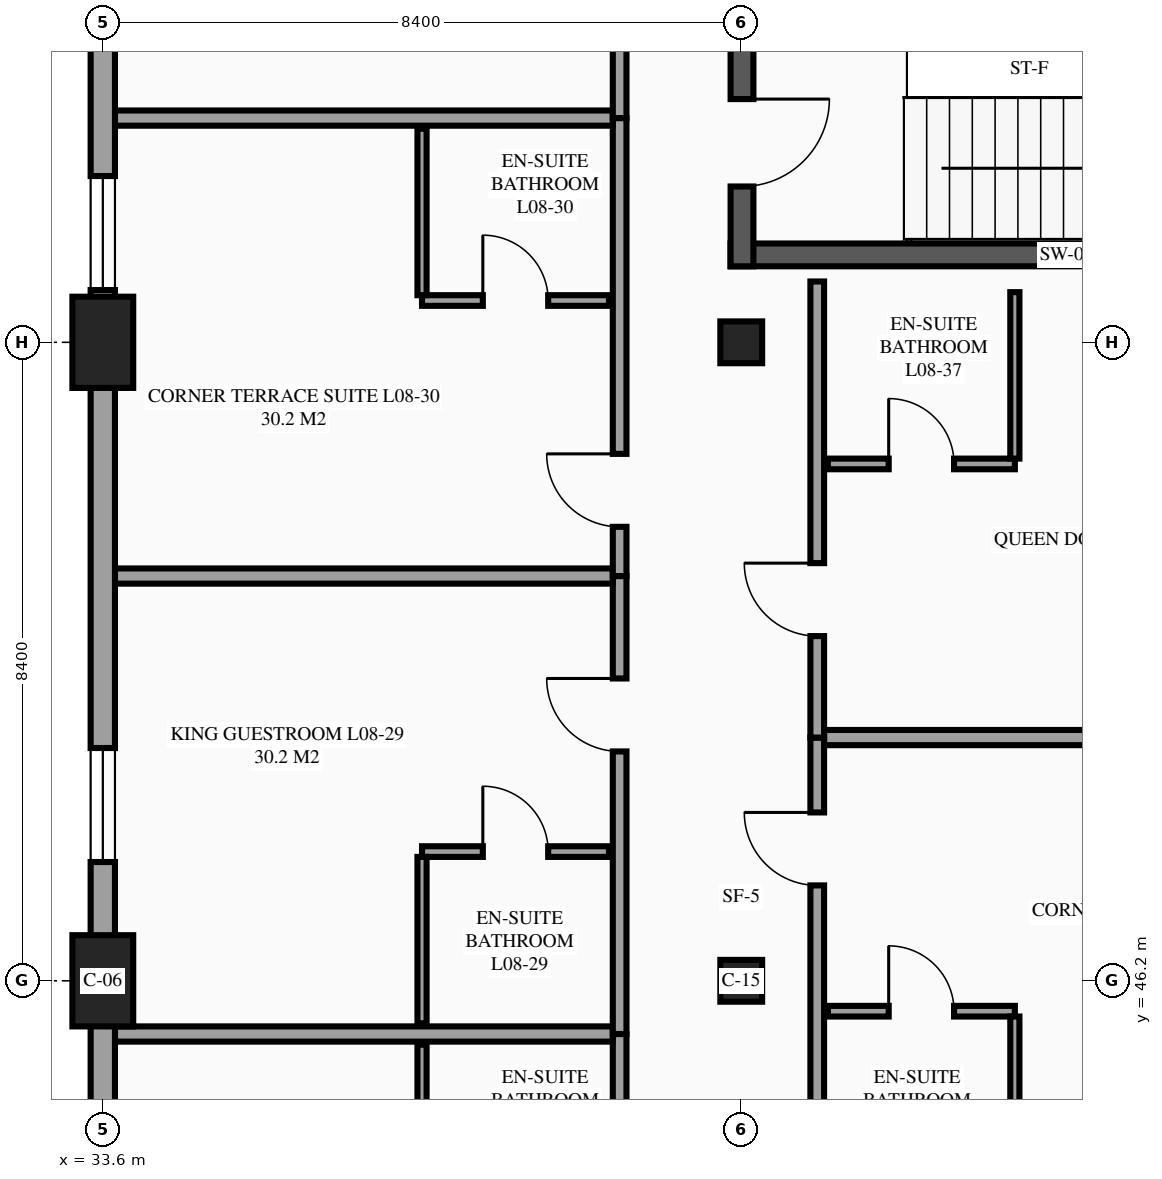
"""IFC4 building model, lengths in metres.
Left out: names, types, materials, properties, quantities, classifications, styles, units other than length and angle.
Written with IfcOpenShell. Run it as: python <this file> out.ifc"""

import sys

from ifc_helpers import new_model, si_unit, direction, frame, frame_2d, origin, origin_2d, place, context, subcontext, project, spatial, rectangle, extrude, element, fill, save


model = new_model("IFC4")
c1 = context("Model", 3, precision=1e-05, world=origin(), true_north=direction((0.0, 1.0)))
c2 = subcontext(c1, "Body", "Model", "MODEL_VIEW")
j1 = project(units=[si_unit("LENGTHUNIT", "METRE"), si_unit("PLANEANGLEUNIT", "RADIAN")], contexts=[c1])
p1 = place(None, origin())
s1 = spatial("IfcSite", under=j1, at=p1, CompositionType="ELEMENT")
p2 = place(p1, origin())
s2 = spatial("IfcBuilding", under=s1, at=p2, CompositionType="ELEMENT")
p3 = place(p2, frame((0.0, 0.0, 32.7)))
s3 = spatial("IfcBuildingStorey", under=s2, at=p3, CompositionType="ELEMENT", Elevation=32.7)
for number, where, z_axis, x_axis in (
    (1, (33.6, 46.2, 0.0), (0.0, 0.0, 1.0), (1.0, 0.0, 0.0)),
    (2, (33.6, 54.6, 0.0), (0.0, 0.0, 1.0), (1.0, 0.0, 0.0)),
):
    element("IfcColumn", number, at=place(p3, frame(where, z_axis=z_axis, x_axis=x_axis)), inside=s3, PredefinedType="COLUMN", context=c2, shape_type="SweptSolid", body=[
        extrude(rectangle(XDim=0.8, YDim=1.2, at=origin_2d()), origin(), (0.0, 0.0, 1.0), 3.6),
    ])
for number, where, z_axis, x_axis in (
    (3, (42.0, 46.2, 0.0), (0.0, 0.0, 1.0), (1.0, 0.0, 0.0)),
    (4, (42.0, 54.6, 0.0), (0.0, 0.0, 1.0), (1.0, 0.0, 0.0)),
):
    element("IfcColumn", number, at=place(p3, frame(where, z_axis=z_axis, x_axis=x_axis)), inside=s3, PredefinedType="COLUMN", context=c2, shape_type="SweptSolid", body=[
        extrude(rectangle(XDim=0.55, YDim=0.55, at=origin_2d()), origin(), (0.0, 0.0, 1.0), 3.6),
    ])
p4 = place(p3, frame((41.86, 55.75, 0.0), z_axis=(0.0, 0.0, 1.0), x_axis=(1.0, 0.0, 0.0)))
e5 = element("IfcWall", 5, at=p4, inside=s3, PredefinedType="SHEAR", context=c2, shape_type="SweptSolid", body=[
    extrude(rectangle(XDim=8.84, YDim=0.3, at=frame_2d((4.42, 0.0))), origin(), (0.0, 0.0, 1.0), 3.6),
])
p5 = place(p3, frame((42.01, 60.8, 0.0), z_axis=(0.0, 0.0, 1.0), x_axis=(0.0, -1.0, 0.0)))
e6 = element("IfcWall", 6, at=p5, inside=s3, PredefinedType="SHEAR", context=c2, shape_type="SweptSolid", body=[
    extrude(rectangle(XDim=5.2, YDim=0.3, at=frame_2d((2.6, 0.0))), origin(), (0.0, 0.0, 1.0), 3.6),
])
p6 = place(p5, frame((3.0, 0.0, 0.0)))
e7 = element("IfcOpeningElement", 7, at=p6, cuts=e6, PredefinedType="OPENING", context=c2, shape_type="SweptSolid", body=[
    extrude(rectangle(XDim=1.15, YDim=2.15, at=frame_2d((0.575, 1.075))), frame((0.0, 0.16, 0.0), z_axis=(0.0, -1.0, 0.0), x_axis=(1.0, 0.0, 0.0)), (0.0, 0.0, 1.0), 0.32),
])
p7 = place(p3, frame((40.4, 39.475, 0.0), z_axis=(0.0, 0.0, 1.0), x_axis=(0.0, 1.0, 0.0)))
e8 = element("IfcWall", 8, at=p7, inside=s3, PredefinedType="PARTITIONING", context=c2, shape_type="SweptSolid", body=[
    extrude(rectangle(XDim=6.025, YDim=0.18, at=frame_2d((3.012, 0.0))), origin(), (0.0, 0.0, 1.0), 3.375),
])
p8 = place(p7, frame((1.347, 0.0, 0.0)))
e9 = element("IfcOpeningElement", 9, at=p8, cuts=e8, PredefinedType="OPENING", context=c2, shape_type="SweptSolid", body=[
    extrude(rectangle(XDim=0.96, YDim=2.15, at=frame_2d((0.48, 1.075))), frame((0.0, 0.1, 0.0), z_axis=(0.0, -1.0, 0.0), x_axis=(1.0, 0.0, 0.0)), (0.0, 0.0, 1.0), 0.2),
])
p9 = place(p3, frame((33.76, 45.5, 0.0), z_axis=(0.0, 0.0, 1.0), x_axis=(1.0, 0.0, 0.0)))
e10 = element("IfcWall", 10, at=p9, inside=s3, PredefinedType="PARTITIONING", context=c2, shape_type="SweptSolid", body=[
    extrude(rectangle(XDim=6.55, YDim=0.2, at=frame_2d((3.275, 0.0))), origin(), (0.0, 0.0, 1.0), 3.375),
])
p10 = place(p3, frame((37.8, 43.17, 0.0), z_axis=(0.0, 0.0, 1.0), x_axis=(0.0, 1.0, 0.0)))
e11 = element("IfcWall", 11, at=p10, inside=s3, PredefinedType="PARTITIONING", context=c2, shape_type="SweptSolid", body=[
    extrude(rectangle(XDim=2.19, YDim=0.12, at=frame_2d((1.095, 0.0))), origin(), (0.0, 0.0, 1.0), 3.375),
])
p11 = place(p3, frame((40.4, 45.5, 0.0), z_axis=(0.0, 0.0, 1.0), x_axis=(0.0, 1.0, 0.0)))
e12 = element("IfcWall", 12, at=p11, inside=s3, PredefinedType="PARTITIONING", context=c2, shape_type="SweptSolid", body=[
    extrude(rectangle(XDim=6.025, YDim=0.18, at=frame_2d((3.012, 0.0))), origin(), (0.0, 0.0, 1.0), 3.375),
])
p12 = place(p11, frame((3.718, 0.0, 0.0)))
e13 = element("IfcOpeningElement", 13, at=p12, cuts=e12, PredefinedType="OPENING", context=c2, shape_type="SweptSolid", body=[
    extrude(rectangle(XDim=0.96, YDim=2.15, at=frame_2d((0.48, 1.075))), frame((0.0, 0.1, 0.0), z_axis=(0.0, -1.0, 0.0), x_axis=(1.0, 0.0, 0.0)), (0.0, 0.0, 1.0), 0.2),
])
p13 = place(p3, frame((33.76, 51.525, 0.0), z_axis=(0.0, 0.0, 1.0), x_axis=(1.0, 0.0, 0.0)))
e14 = element("IfcWall", 14, at=p13, inside=s3, PredefinedType="PARTITIONING", context=c2, shape_type="SweptSolid", body=[
    extrude(rectangle(XDim=6.55, YDim=0.2, at=frame_2d((3.275, 0.0))), origin(), (0.0, 0.0, 1.0), 3.375),
])
p14 = place(p3, frame((37.8, 47.9, 0.0), z_axis=(0.0, 0.0, 1.0), x_axis=(1.0, 0.0, 0.0)))
e15 = element("IfcWall", 15, at=p14, inside=s3, PredefinedType="PARTITIONING", context=c2, shape_type="SweptSolid", body=[
    extrude(rectangle(XDim=2.46, YDim=0.14, at=frame_2d((1.23, 0.0))), origin(), (0.0, 0.0, 1.0), 3.375),
])
p15 = place(p14, frame((0.8, 0.0, 0.0)))
e16 = element("IfcOpeningElement", 16, at=p15, cuts=e15, PredefinedType="OPENING", context=c2, shape_type="SweptSolid", body=[
    extrude(rectangle(XDim=0.86, YDim=2.1, at=frame_2d((0.43, 1.05))), frame((0.0, 0.08, 0.0), z_axis=(0.0, -1.0, 0.0), x_axis=(1.0, 0.0, 0.0)), (0.0, 0.0, 1.0), 0.16),
])
p16 = place(p3, frame((37.8, 45.64, 0.0), z_axis=(0.0, 0.0, 1.0), x_axis=(0.0, 1.0, 0.0)))
e17 = element("IfcWall", 17, at=p16, inside=s3, PredefinedType="PARTITIONING", context=c2, shape_type="SweptSolid", body=[
    extrude(rectangle(XDim=2.19, YDim=0.12, at=frame_2d((1.095, 0.0))), origin(), (0.0, 0.0, 1.0), 3.375),
])
p17 = place(p3, frame((40.4, 51.525, 0.0), z_axis=(0.0, 0.0, 1.0), x_axis=(0.0, 1.0, 0.0)))
e18 = element("IfcWall", 18, at=p17, inside=s3, PredefinedType="PARTITIONING", context=c2, shape_type="SweptSolid", body=[
    extrude(rectangle(XDim=6.025, YDim=0.18, at=frame_2d((3.013, 0.0))), origin(), (0.0, 0.0, 1.0), 3.375),
])
p18 = place(p17, frame((0.647, 0.0, 0.0)))
e19 = element("IfcOpeningElement", 19, at=p18, cuts=e18, PredefinedType="OPENING", context=c2, shape_type="SweptSolid", body=[
    extrude(rectangle(XDim=0.96, YDim=2.15, at=frame_2d((0.48, 1.075))), frame((0.0, 0.1, 0.0), z_axis=(0.0, -1.0, 0.0), x_axis=(1.0, 0.0, 0.0)), (0.0, 0.0, 1.0), 0.2),
])
p19 = place(p3, frame((33.76, 57.55, 0.0), z_axis=(0.0, 0.0, 1.0), x_axis=(1.0, 0.0, 0.0)))
e20 = element("IfcWall", 20, at=p19, inside=s3, PredefinedType="PARTITIONING", context=c2, shape_type="SweptSolid", body=[
    extrude(rectangle(XDim=6.55, YDim=0.2, at=frame_2d((3.275, 0.0))), origin(), (0.0, 0.0, 1.0), 3.375),
])
p20 = place(p3, frame((37.8, 55.15, 0.0), z_axis=(0.0, 0.0, 1.0), x_axis=(1.0, 0.0, 0.0)))
e21 = element("IfcWall", 21, at=p20, inside=s3, PredefinedType="PARTITIONING", context=c2, shape_type="SweptSolid", body=[
    extrude(rectangle(XDim=2.46, YDim=0.14, at=frame_2d((1.23, 0.0))), origin(), (0.0, 0.0, 1.0), 3.375),
])
p21 = place(p20, frame((0.8, 0.0, 0.0)))
e22 = element("IfcOpeningElement", 22, at=p21, cuts=e21, PredefinedType="OPENING", context=c2, shape_type="SweptSolid", body=[
    extrude(rectangle(XDim=0.86, YDim=2.1, at=frame_2d((0.43, 1.05))), frame((0.0, 0.08, 0.0), z_axis=(0.0, -1.0, 0.0), x_axis=(1.0, 0.0, 0.0)), (0.0, 0.0, 1.0), 0.16),
])
p22 = place(p3, frame((37.8, 55.22, 0.0), z_axis=(0.0, 0.0, 1.0), x_axis=(0.0, 1.0, 0.0)))
e23 = element("IfcWall", 23, at=p22, inside=s3, PredefinedType="PARTITIONING", context=c2, shape_type="SweptSolid", body=[
    extrude(rectangle(XDim=2.19, YDim=0.12, at=frame_2d((1.095, 0.0))), origin(), (0.0, 0.0, 1.0), 3.375),
])
p23 = place(p3, frame((40.4, 57.55, 0.0), z_axis=(0.0, 0.0, 1.0), x_axis=(0.0, 1.0, 0.0)))
e24 = element("IfcWall", 24, at=p23, inside=s3, PredefinedType="PARTITIONING", context=c2, shape_type="SweptSolid", body=[
    extrude(rectangle(XDim=6.025, YDim=0.18, at=frame_2d((3.012, 0.0))), origin(), (0.0, 0.0, 1.0), 3.375),
])
p24 = place(p23, frame((1.347, 0.0, 0.0)))
e25 = element("IfcOpeningElement", 25, at=p24, cuts=e24, PredefinedType="OPENING", context=c2, shape_type="SweptSolid", body=[
    extrude(rectangle(XDim=0.96, YDim=2.15, at=frame_2d((0.48, 1.075))), frame((0.0, 0.1, 0.0), z_axis=(0.0, -1.0, 0.0), x_axis=(1.0, 0.0, 0.0)), (0.0, 0.0, 1.0), 0.2),
])
p25 = place(p3, frame((43.0, 43.4, 0.0), z_axis=(0.0, 0.0, 1.0), x_axis=(0.0, 1.0, 0.0)))
e26 = element("IfcWall", 26, at=p25, inside=s3, PredefinedType="PARTITIONING", context=c2, shape_type="SweptSolid", body=[
    extrude(rectangle(XDim=6.0, YDim=0.18, at=frame_2d((3.0, 0.0))), origin(), (0.0, 0.0, 1.0), 3.375),
])
p26 = place(p25, frame((4.055, 0.0, 0.0)))
e27 = element("IfcOpeningElement", 27, at=p26, cuts=e26, PredefinedType="OPENING", context=c2, shape_type="SweptSolid", body=[
    extrude(rectangle(XDim=0.96, YDim=2.15, at=frame_2d((0.48, 1.075))), frame((0.0, 0.1, 0.0), z_axis=(0.0, -1.0, 0.0), x_axis=(1.0, 0.0, 0.0)), (0.0, 0.0, 1.0), 0.2),
])
p27 = place(p3, frame((43.09, 49.4, 0.0), z_axis=(0.0, 0.0, 1.0), x_axis=(1.0, 0.0, 0.0)))
e28 = element("IfcWall", 28, at=p27, inside=s3, PredefinedType="PARTITIONING", context=c2, shape_type="SweptSolid", body=[
    extrude(rectangle(XDim=7.15, YDim=0.2, at=frame_2d((3.575, 0.0))), origin(), (0.0, 0.0, 1.0), 3.375),
])
p28 = place(p3, frame((43.14, 45.8, 0.0), z_axis=(0.0, 0.0, 1.0), x_axis=(1.0, 0.0, 0.0)))
e29 = element("IfcWall", 29, at=p28, inside=s3, PredefinedType="PARTITIONING", context=c2, shape_type="SweptSolid", body=[
    extrude(rectangle(XDim=2.46, YDim=0.14, at=frame_2d((1.23, 0.0))), origin(), (0.0, 0.0, 1.0), 3.375),
])
p29 = place(p28, frame((0.8, 0.0, 0.0)))
e30 = element("IfcOpeningElement", 30, at=p29, cuts=e29, PredefinedType="OPENING", context=c2, shape_type="SweptSolid", body=[
    extrude(rectangle(XDim=0.86, YDim=2.1, at=frame_2d((0.43, 1.05))), frame((0.0, 0.08, 0.0), z_axis=(0.0, -1.0, 0.0), x_axis=(1.0, 0.0, 0.0)), (0.0, 0.0, 1.0), 0.16),
])
p30 = place(p3, frame((45.6, 43.54, 0.0), z_axis=(0.0, 0.0, 1.0), x_axis=(0.0, 1.0, 0.0)))
e31 = element("IfcWall", 31, at=p30, inside=s3, PredefinedType="PARTITIONING", context=c2, shape_type="SweptSolid", body=[
    extrude(rectangle(XDim=2.19, YDim=0.12, at=frame_2d((1.095, 0.0))), origin(), (0.0, 0.0, 1.0), 3.375),
])
p31 = place(p3, frame((43.0, 49.4, 0.0), z_axis=(0.0, 0.0, 1.0), x_axis=(0.0, 1.0, 0.0)))
e32 = element("IfcWall", 32, at=p31, inside=s3, PredefinedType="PARTITIONING", context=c2, shape_type="SweptSolid", body=[
    extrude(rectangle(XDim=6.0, YDim=0.18, at=frame_2d((3.0, 0.0))), origin(), (0.0, 0.0, 1.0), 3.375),
])
p32 = place(p31, frame((1.335, 0.0, 0.0)))
e33 = element("IfcOpeningElement", 33, at=p32, cuts=e32, PredefinedType="OPENING", context=c2, shape_type="SweptSolid", body=[
    extrude(rectangle(XDim=0.96, YDim=2.15, at=frame_2d((0.48, 1.075))), frame((0.0, 0.1, 0.0), z_axis=(0.0, -1.0, 0.0), x_axis=(1.0, 0.0, 0.0)), (0.0, 0.0, 1.0), 0.2),
])
p33 = place(p3, frame((43.14, 53.0, 0.0), z_axis=(0.0, 0.0, 1.0), x_axis=(1.0, 0.0, 0.0)))
e34 = element("IfcWall", 34, at=p33, inside=s3, PredefinedType="PARTITIONING", context=c2, shape_type="SweptSolid", body=[
    extrude(rectangle(XDim=2.46, YDim=0.14, at=frame_2d((1.23, 0.0))), origin(), (0.0, 0.0, 1.0), 3.375),
])
p34 = place(p33, frame((0.8, 0.0, 0.0)))
e35 = element("IfcOpeningElement", 35, at=p34, cuts=e34, PredefinedType="OPENING", context=c2, shape_type="SweptSolid", body=[
    extrude(rectangle(XDim=0.86, YDim=2.1, at=frame_2d((0.43, 1.05))), frame((0.0, 0.08, 0.0), z_axis=(0.0, -1.0, 0.0), x_axis=(1.0, 0.0, 0.0)), (0.0, 0.0, 1.0), 0.16),
])
p35 = place(p3, frame((45.6, 53.07, 0.0), z_axis=(0.0, 0.0, 1.0), x_axis=(0.0, 1.0, 0.0)))
e36 = element("IfcWall", 36, at=p35, inside=s3, PredefinedType="PARTITIONING", context=c2, shape_type="SweptSolid", body=[
    extrude(rectangle(XDim=2.19, YDim=0.12, at=frame_2d((1.095, 0.0))), origin(), (0.0, 0.0, 1.0), 3.375),
])
p36 = place(p3, frame((33.6, 63.0, 0.0), z_axis=(0.0, 0.0, 1.0), x_axis=(0.0, -1.0, 0.0)))
e37 = element("IfcWall", 37, at=p36, inside=s3, PredefinedType="STANDARD", context=c2, shape_type="SweptSolid", body=[
    extrude(rectangle(XDim=8.4, YDim=0.32, at=frame_2d((4.2, 0.0))), origin(), (0.0, 0.0, 1.0), 2.78),
])
p37 = place(p36, frame((6.212, 0.0, 0.85)))
e38 = element("IfcOpeningElement", 38, at=p37, cuts=e37, PredefinedType="OPENING", context=c2, shape_type="SweptSolid", body=[
    extrude(rectangle(XDim=1.5, YDim=1.5, at=frame_2d((0.75, 0.75))), frame((0.0, 0.17, 0.0), z_axis=(0.0, -1.0, 0.0), x_axis=(1.0, 0.0, 0.0)), (0.0, 0.0, 1.0), 0.34),
])
p38 = place(p36, frame((1.688, 0.0, 0.85)))
e39 = element("IfcOpeningElement", 39, at=p38, cuts=e37, PredefinedType="OPENING", context=c2, shape_type="SweptSolid", body=[
    extrude(rectangle(XDim=1.5, YDim=1.5, at=frame_2d((0.75, 0.75))), frame((0.0, 0.17, 0.0), z_axis=(0.0, -1.0, 0.0), x_axis=(1.0, 0.0, 0.0)), (0.0, 0.0, 1.0), 0.34),
])
p39 = place(p3, frame((33.6, 54.6, 0.0), z_axis=(0.0, 0.0, 1.0), x_axis=(0.0, -1.0, 0.0)))
e40 = element("IfcWall", 40, at=p39, inside=s3, PredefinedType="STANDARD", context=c2, shape_type="SweptSolid", body=[
    extrude(rectangle(XDim=8.4, YDim=0.32, at=frame_2d((4.2, 0.0))), origin(), (0.0, 0.0, 1.0), 3.075),
])
p40 = place(p39, frame((5.337, 0.0, 0.85)))
e41 = element("IfcOpeningElement", 41, at=p40, cuts=e40, PredefinedType="OPENING", context=c2, shape_type="SweptSolid", body=[
    extrude(rectangle(XDim=1.5, YDim=1.5, at=frame_2d((0.75, 0.75))), frame((0.0, 0.17, 0.0), z_axis=(0.0, -1.0, 0.0), x_axis=(1.0, 0.0, 0.0)), (0.0, 0.0, 1.0), 0.34),
])
p41 = place(p3, frame((33.6, 46.2, 0.0), z_axis=(0.0, 0.0, 1.0), x_axis=(0.0, -1.0, 0.0)))
e42 = element("IfcWall", 42, at=p41, inside=s3, PredefinedType="STANDARD", context=c2, shape_type="SweptSolid", body=[
    extrude(rectangle(XDim=8.4, YDim=0.32, at=frame_2d((4.2, 0.0))), origin(), (0.0, 0.0, 1.0), 2.73),
])
p42 = place(p41, frame((2.962, 0.0, 0.85)))
e43 = element("IfcOpeningElement", 43, at=p42, cuts=e42, PredefinedType="OPENING", context=c2, shape_type="SweptSolid", body=[
    extrude(rectangle(XDim=1.5, YDim=1.5, at=frame_2d((0.75, 0.75))), frame((0.0, 0.17, 0.0), z_axis=(0.0, -1.0, 0.0), x_axis=(1.0, 0.0, 0.0)), (0.0, 0.0, 1.0), 0.34),
])
p43 = place(p40, origin())
e44 = element("IfcWindow", 44, at=p43, inside=s3, PartitioningType="SINGLE_PANEL", PredefinedType="WINDOW", context=c2, shape_type="SweptSolid", body=[
    extrude(rectangle(XDim=1.5, YDim=1.5, at=frame_2d((0.75, 0.75))), frame((0.0, 0.03, 0.0), z_axis=(0.0, -1.0, 0.0), x_axis=(1.0, 0.0, 0.0)), (0.0, 0.0, 1.0), 0.06),
])
fill(e41, e44)
p44 = place(p37, origin())
e45 = element("IfcWindow", 45, at=p44, inside=s3, PartitioningType="SINGLE_PANEL", PredefinedType="WINDOW", context=c2, shape_type="SweptSolid", body=[
    extrude(rectangle(XDim=1.5, YDim=1.5, at=frame_2d((0.75, 0.75))), frame((0.0, 0.03, 0.0), z_axis=(0.0, -1.0, 0.0), x_axis=(1.0, 0.0, 0.0)), (0.0, 0.0, 1.0), 0.06),
])
fill(e38, e45)
p45 = place(p6, origin())
e46 = element("IfcDoor", 46, at=p45, inside=s3, OperationType="SINGLE_SWING_LEFT", PredefinedType="DOOR", context=c2, shape_type="SweptSolid", body=[
    extrude(rectangle(XDim=1.15, YDim=2.15, at=frame_2d((0.575, 1.075))), frame((0.0, 0.025, 0.0), z_axis=(0.0, -1.0, 0.0), x_axis=(1.0, 0.0, 0.0)), (0.0, 0.0, 1.0), 0.05),
])
fill(e7, e46)
p46 = place(p12, origin())
e47 = element("IfcDoor", 47, at=p46, inside=s3, OperationType="SINGLE_SWING_RIGHT", PredefinedType="DOOR", context=c2, shape_type="SweptSolid", body=[
    extrude(rectangle(XDim=0.96, YDim=2.15, at=frame_2d((0.48, 1.075))), frame((0.0, 0.025, 0.0), z_axis=(0.0, -1.0, 0.0), x_axis=(1.0, 0.0, 0.0)), (0.0, 0.0, 1.0), 0.05),
])
fill(e13, e47)
p47 = place(p15, origin())
e48 = element("IfcDoor", 48, at=p47, inside=s3, OperationType="SINGLE_SWING_LEFT", PredefinedType="DOOR", context=c2, shape_type="SweptSolid", body=[
    extrude(rectangle(XDim=0.86, YDim=2.1, at=frame_2d((0.43, 1.05))), frame((0.0, 0.025, 0.0), z_axis=(0.0, -1.0, 0.0), x_axis=(1.0, 0.0, 0.0)), (0.0, 0.0, 1.0), 0.05),
])
fill(e16, e48)
p48 = place(p18, origin())
e49 = element("IfcDoor", 49, at=p48, inside=s3, OperationType="SINGLE_SWING_RIGHT", PredefinedType="DOOR", context=c2, shape_type="SweptSolid", body=[
    extrude(rectangle(XDim=0.96, YDim=2.15, at=frame_2d((0.48, 1.075))), frame((0.0, 0.025, 0.0), z_axis=(0.0, -1.0, 0.0), x_axis=(1.0, 0.0, 0.0)), (0.0, 0.0, 1.0), 0.05),
])
fill(e19, e49)
p49 = place(p21, origin())
e50 = element("IfcDoor", 50, at=p49, inside=s3, OperationType="SINGLE_SWING_LEFT", PredefinedType="DOOR", context=c2, shape_type="SweptSolid", body=[
    extrude(rectangle(XDim=0.86, YDim=2.1, at=frame_2d((0.43, 1.05))), frame((0.0, 0.025, 0.0), z_axis=(0.0, -1.0, 0.0), x_axis=(1.0, 0.0, 0.0)), (0.0, 0.0, 1.0), 0.05),
])
fill(e22, e50)
p50 = place(p26, origin())
e51 = element("IfcDoor", 51, at=p50, inside=s3, OperationType="SINGLE_SWING_RIGHT", PredefinedType="DOOR", context=c2, shape_type="SweptSolid", body=[
    extrude(rectangle(XDim=0.96, YDim=2.15, at=frame_2d((0.48, 1.075))), frame((0.0, 0.025, 0.0), z_axis=(0.0, -1.0, 0.0), x_axis=(1.0, 0.0, 0.0)), (0.0, 0.0, 1.0), 0.05),
])
fill(e27, e51)
p51 = place(p29, origin())
e52 = element("IfcDoor", 52, at=p51, inside=s3, OperationType="SINGLE_SWING_LEFT", PredefinedType="DOOR", context=c2, shape_type="SweptSolid", body=[
    extrude(rectangle(XDim=0.86, YDim=2.1, at=frame_2d((0.43, 1.05))), frame((0.0, 0.025, 0.0), z_axis=(0.0, -1.0, 0.0), x_axis=(1.0, 0.0, 0.0)), (0.0, 0.0, 1.0), 0.05),
])
fill(e30, e52)
p52 = place(p32, origin())
e53 = element("IfcDoor", 53, at=p52, inside=s3, OperationType="SINGLE_SWING_RIGHT", PredefinedType="DOOR", context=c2, shape_type="SweptSolid", body=[
    extrude(rectangle(XDim=0.96, YDim=2.15, at=frame_2d((0.48, 1.075))), frame((0.0, 0.025, 0.0), z_axis=(0.0, -1.0, 0.0), x_axis=(1.0, 0.0, 0.0)), (0.0, 0.0, 1.0), 0.05),
])
fill(e33, e53)
p53 = place(p34, origin())
e54 = element("IfcDoor", 54, at=p53, inside=s3, OperationType="SINGLE_SWING_LEFT", PredefinedType="DOOR", context=c2, shape_type="SweptSolid", body=[
    extrude(rectangle(XDim=0.86, YDim=2.1, at=frame_2d((0.43, 1.05))), frame((0.0, 0.025, 0.0), z_axis=(0.0, -1.0, 0.0), x_axis=(1.0, 0.0, 0.0)), (0.0, 0.0, 1.0), 0.05),
])
fill(e35, e54)
save(model, sys.argv[1])
